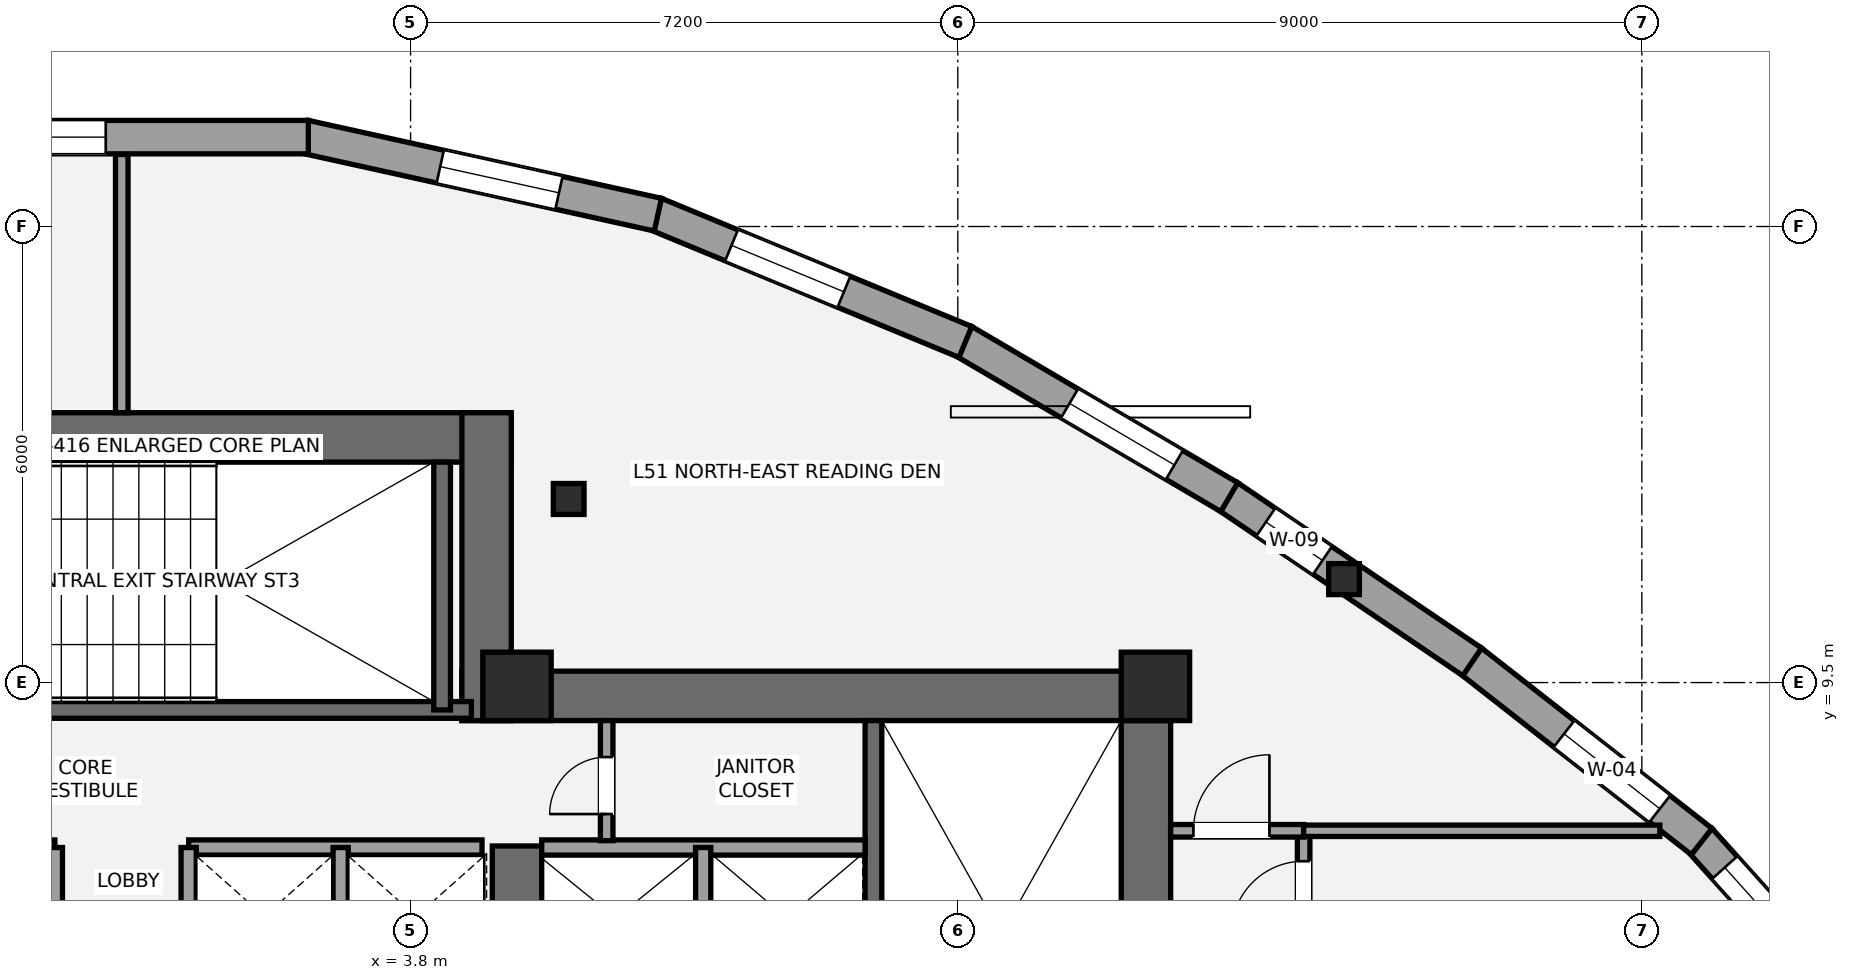
"""IFC4 building model, lengths in metres.
Left out: names, types, materials, properties, quantities, classifications, styles, units other than length and angle.
Written with IfcOpenShell. Run it as: python <this file> out.ifc"""

import sys

from ifc_helpers import new_model, si_unit, direction, frame, frame_2d, origin, origin_2d, place, context, subcontext, project, spatial, rectangle, i_section, extrude, element, fill, save


model = new_model("IFC4")
c1 = context("Model", 3, precision=1e-05, world=origin(), true_north=direction((0.0, 1.0)))
c2 = subcontext(c1, "Body", "Model", "MODEL_VIEW")
j1 = project(units=[si_unit("LENGTHUNIT", "METRE"), si_unit("PLANEANGLEUNIT", "RADIAN")], contexts=[c1])
p1 = place(None, origin())
s1 = spatial("IfcSite", under=j1, at=p1, CompositionType="ELEMENT")
p2 = place(p1, origin())
s2 = spatial("IfcBuilding", under=s1, at=p2, CompositionType="ELEMENT")
p3 = place(p2, frame((0.0, 0.0, 185.4)))
s3 = spatial("IfcBuildingStorey", under=s2, at=p3, CompositionType="ELEMENT", Elevation=185.4)
p4 = place(p3, frame((13.475, 1.2, 0.0), z_axis=(0.0, 0.0, 1.0), x_axis=(0.0, 1.0, 0.0)))
e1 = element("IfcWall", 1, at=p4, inside=s3, PredefinedType="SHEAR", context=c2, shape_type="SweptSolid", body=[
    extrude(rectangle(XDim=8.45, YDim=0.65, at=frame_2d((4.225, 0.0))), origin(), (0.0, 0.0, 1.0), 3.2),
])
p5 = place(p3, frame((4.475, 9.325, 0.0), z_axis=(0.0, 0.0, 1.0), x_axis=(1.0, 0.0, 0.0)))
e2 = element("IfcWall", 2, at=p5, inside=s3, PredefinedType="SHEAR", context=c2, shape_type="SweptSolid", body=[
    extrude(rectangle(XDim=9.325, YDim=0.65, at=frame_2d((4.663, 0.0))), origin(), (0.0, 0.0, 1.0), 3.2),
])
p6 = place(p3, frame((5.2, 5.35, 0.0), z_axis=(0.0, 0.0, 1.0), x_axis=(0.0, 1.0, 0.0)))
e3 = element("IfcWall", 3, at=p6, inside=s3, PredefinedType="SHEAR", context=c2, shape_type="SweptSolid", body=[
    extrude(rectangle(XDim=2.0, YDim=0.65, at=frame_2d((1.0, 0.0))), origin(), (0.0, 0.0, 1.0), 3.2),
])
p7 = place(p3, frame((9.89, 1.85, 0.0), z_axis=(0.0, 0.0, 1.0), x_axis=(0.0, 1.0, 0.0)))
e4 = element("IfcWall", 4, at=p7, inside=s3, PredefinedType="SHEAR", context=c2, shape_type="SweptSolid", body=[
    extrude(rectangle(XDim=7.15, YDim=0.22, at=frame_2d((3.575, 0.0))), origin(), (0.0, 0.0, 1.0), 3.2),
])
p8 = place(p3, frame((-5.125, 12.725, 0.0), z_axis=(0.0, 0.0, 1.0), x_axis=(1.0, 0.0, 0.0)))
e5 = element("IfcWall", 5, at=p8, inside=s3, PredefinedType="SHEAR", context=c2, shape_type="SweptSolid", body=[
    extrude(rectangle(XDim=10.25, YDim=0.65, at=frame_2d((5.125, 0.0))), origin(), (0.0, 0.0, 1.0), 3.2),
])
p9 = place(p3, frame((4.8, 9.0, 0.0), z_axis=(0.0, 0.0, 1.0), x_axis=(0.0, 1.0, 0.0)))
e6 = element("IfcWall", 6, at=p9, inside=s3, PredefinedType="SHEAR", context=c2, shape_type="SweptSolid", body=[
    extrude(rectangle(XDim=4.05, YDim=0.65, at=frame_2d((2.025, 0.0))), origin(), (0.0, 0.0, 1.0), 3.2),
])
p10 = place(p3, frame((-4.7, 9.14, 0.0), z_axis=(0.0, 0.0, 1.0), x_axis=(1.0, 0.0, 0.0)))
e7 = element("IfcWall", 7, at=p10, inside=s3, PredefinedType="SHEAR", context=c2, shape_type="SweptSolid", body=[
    extrude(rectangle(XDim=9.3, YDim=0.22, at=frame_2d((4.65, 0.0))), origin(), (0.0, 0.0, 1.0), 3.2),
])
p11 = place(p10, frame((1.15, 0.0, 0.0)))
e8 = element("IfcOpeningElement", 8, at=p11, cuts=e7, PredefinedType="OPENING", context=c2, shape_type="SweptSolid", body=[
    extrude(rectangle(XDim=1.05, YDim=2.15, at=frame_2d((0.525, 1.075))), frame((0.0, 0.12, 0.0), z_axis=(0.0, -1.0, 0.0), x_axis=(1.0, 0.0, 0.0)), (0.0, 0.0, 1.0), 0.24),
])
p12 = place(p3, frame((4.215, 9.14, 0.0), z_axis=(0.0, 0.0, 1.0), x_axis=(0.0, 1.0, 0.0)))
e9 = element("IfcWall", 9, at=p12, inside=s3, PredefinedType="SHEAR", context=c2, shape_type="SweptSolid", body=[
    extrude(rectangle(XDim=3.26, YDim=0.22, at=frame_2d((1.63, 0.0))), origin(), (0.0, 0.0, 1.0), 3.2),
])
for number, where, z_axis, x_axis in (
    (10, (5.2, 9.45, 0.0), (0.0, 0.0, 1.0), (1.0, 0.0, 0.0)),
    (11, (13.6, 9.45, 0.0), (0.0, 0.0, 1.0), (1.0, 0.0, 0.0)),
):
    element("IfcColumn", number, at=place(p3, frame(where, z_axis=z_axis, x_axis=x_axis)), inside=s3, PredefinedType="COLUMN", context=c2, shape_type="SweptSolid", body=[
        extrude(rectangle(XDim=0.9, YDim=0.9, at=origin_2d()), origin(), (0.0, 0.0, 1.0), 3.2),
    ])
for number, where, z_axis, x_axis in (
    (12, (16.082, 10.861, 0.0), (0.0, 0.0, 1.0), (1.0, 0.0, 0.0)),
    (13, (5.88, 11.915, 0.0), (0.0, 0.0, 1.0), (1.0, 0.0, 0.0)),
):
    element("IfcColumn", number, at=place(p3, frame(where, z_axis=z_axis, x_axis=x_axis)), inside=s3, PredefinedType="COLUMN", context=c2, shape_type="SweptSolid", body=[
        extrude(i_section(OverallWidth=0.404, OverallDepth=0.407, WebThickness=0.027, FlangeThickness=0.044, at=origin_2d()), origin(), (0.0, 0.0, 1.0), 3.2),
    ])
p13 = place(p3, frame((20.759, 7.435, 0.0), z_axis=(0.0, 0.0, 1.0), x_axis=(0.668547778607, -0.743669192396, 0.0)))
e14 = element("IfcWall", 14, at=p13, inside=s3, PredefinedType="STANDARD", context=c2, shape_type="SweptSolid", body=[
    extrude(rectangle(XDim=3.721, YDim=0.44, at=frame_2d((1.861, 0.0))), origin(), (0.0, 0.0, 1.0), 2.315),
])
p14 = place(p13, frame((0.495, 0.0, 0.58)))
e15 = element("IfcOpeningElement", 15, at=p14, cuts=e14, PredefinedType="OPENING", context=c2, shape_type="SweptSolid", body=[
    extrude(rectangle(XDim=1.6, YDim=1.55, at=frame_2d((0.8, 0.775))), frame((0.0, 0.23, 0.0), z_axis=(0.0, -1.0, 0.0), x_axis=(1.0, 0.0, 0.0)), (0.0, 0.0, 1.0), 0.46),
])
p15 = place(p3, frame((17.756, 9.781, 0.0), z_axis=(0.0, 0.0, 1.0), x_axis=(0.787518383176, -0.616291161838, 0.0)))
e16 = element("IfcWall", 16, at=p15, inside=s3, PredefinedType="STANDARD", context=c2, shape_type="SweptSolid", body=[
    extrude(rectangle(XDim=3.85, YDim=0.44, at=frame_2d((1.925, 0.0))), origin(), (0.0, 0.0, 1.0), 2.315),
])
p16 = place(p15, frame((1.55, 0.0, 0.58)))
e17 = element("IfcOpeningElement", 17, at=p16, cuts=e16, PredefinedType="OPENING", context=c2, shape_type="SweptSolid", body=[
    extrude(rectangle(XDim=1.6, YDim=1.55, at=frame_2d((0.8, 0.775))), frame((0.0, 0.23, 0.0), z_axis=(0.0, -1.0, 0.0), x_axis=(1.0, 0.0, 0.0)), (0.0, 0.0, 1.0), 0.46),
])
p17 = place(p3, frame((14.56, 11.947, 0.0), z_axis=(0.0, 0.0, 1.0), x_axis=(0.82774221662, -0.561108565988, 0.0)))
e18 = element("IfcWall", 18, at=p17, inside=s3, PredefinedType="STANDARD", context=c2, shape_type="SweptSolid", body=[
    extrude(rectangle(XDim=3.876, YDim=0.44, at=frame_2d((1.938, 0.0))), origin(), (0.0, 0.0, 1.0), 2.315),
])
p18 = place(p17, frame((0.596, 0.0, 0.58)))
e19 = element("IfcOpeningElement", 19, at=p18, cuts=e18, PredefinedType="OPENING", context=c2, shape_type="SweptSolid", body=[
    extrude(rectangle(XDim=0.9, YDim=1.35, at=frame_2d((0.45, 0.675))), frame((0.0, 0.23, 0.0), z_axis=(0.0, -1.0, 0.0), x_axis=(1.0, 0.0, 0.0)), (0.0, 0.0, 1.0), 0.46),
])
p19 = place(p3, frame((11.072, 13.995, 0.0), z_axis=(0.0, 0.0, 1.0), x_axis=(0.862269598443, -0.506449542995, 0.0)))
e20 = element("IfcWall", 20, at=p19, inside=s3, PredefinedType="STANDARD", context=c2, shape_type="SweptSolid", body=[
    extrude(rectangle(XDim=4.059, YDim=0.44, at=frame_2d((2.029, 0.0))), origin(), (0.0, 0.0, 1.0), 2.315),
])
p20 = place(p19, frame((1.621, 0.0, 0.58)))
e21 = element("IfcOpeningElement", 21, at=p20, cuts=e20, PredefinedType="OPENING", context=c2, shape_type="SweptSolid", body=[
    extrude(rectangle(XDim=1.6, YDim=1.55, at=frame_2d((0.8, 0.775))), frame((0.0, 0.23, 0.0), z_axis=(0.0, -1.0, 0.0), x_axis=(1.0, 0.0, 0.0)), (0.0, 0.0, 1.0), 0.46),
])
p21 = place(p3, frame((7.018, 15.667, 0.0), z_axis=(0.0, 0.0, 1.0), x_axis=(0.924224109839, -0.381850487486, 0.0)))
e22 = element("IfcWall", 22, at=p21, inside=s3, PredefinedType="STANDARD", context=c2, shape_type="SweptSolid", body=[
    extrude(rectangle(XDim=4.417, YDim=0.44, at=frame_2d((2.208, 0.0))), origin(), (0.0, 0.0, 1.0), 2.315),
])
p22 = place(p21, frame((1.088, 0.0, 0.58)))
e23 = element("IfcOpeningElement", 23, at=p22, cuts=e22, PredefinedType="OPENING", context=c2, shape_type="SweptSolid", body=[
    extrude(rectangle(XDim=1.6, YDim=1.55, at=frame_2d((0.8, 0.775))), frame((0.0, 0.23, 0.0), z_axis=(0.0, -1.0, 0.0), x_axis=(1.0, 0.0, 0.0)), (0.0, 0.0, 1.0), 0.46),
])
p23 = place(p3, frame((2.407, 16.681, 0.0), z_axis=(0.0, 0.0, 1.0), x_axis=(0.976520281828, -0.215425484049, 0.0)))
e24 = element("IfcWall", 24, at=p23, inside=s3, PredefinedType="STANDARD", context=c2, shape_type="SweptSolid", body=[
    extrude(rectangle(XDim=4.759, YDim=0.44, at=frame_2d((2.379, 0.0))), origin(), (0.0, 0.0, 1.0), 2.315),
])
p24 = place(p23, frame((1.826, 0.0, 0.58)))
e25 = element("IfcOpeningElement", 25, at=p24, cuts=e24, PredefinedType="OPENING", context=c2, shape_type="SweptSolid", body=[
    extrude(rectangle(XDim=1.6, YDim=1.55, at=frame_2d((0.8, 0.775))), frame((0.0, 0.23, 0.0), z_axis=(0.0, -1.0, 0.0), x_axis=(1.0, 0.0, 0.0)), (0.0, 0.0, 1.0), 0.46),
])
p25 = place(p3, frame((-2.455, 16.676, 0.0), z_axis=(0.0, 0.0, 1.0), x_axis=(1.0, 0.0, 0.0)))
e26 = element("IfcWall", 26, at=p25, inside=s3, PredefinedType="STANDARD", context=c2, shape_type="SweptSolid", body=[
    extrude(rectangle(XDim=4.909, YDim=0.44, at=frame_2d((2.455, 0.0))), origin(), (0.0, 0.0, 1.0), 2.315),
])
p26 = place(p25, frame((0.644, 0.0, 0.58)))
e27 = element("IfcOpeningElement", 27, at=p26, cuts=e26, PredefinedType="OPENING", context=c2, shape_type="SweptSolid", body=[
    extrude(rectangle(XDim=1.6, YDim=1.55, at=frame_2d((0.8, 0.775))), frame((0.0, 0.23, 0.0), z_axis=(0.0, -1.0, 0.0), x_axis=(1.0, 0.0, 0.0)), (0.0, 0.0, 1.0), 0.46),
])
p27 = place(p3, frame((5.525, 7.33, 0.0), z_axis=(0.0, 0.0, 1.0), x_axis=(1.0, 0.0, 0.0)))
e28 = element("IfcWall", 28, at=p27, inside=s3, PredefinedType="SOLIDWALL", context=c2, shape_type="SweptSolid", body=[
    extrude(rectangle(XDim=4.255, YDim=0.2, at=frame_2d((2.127, 0.0))), origin(), (0.0, 0.0, 1.0), 3.02),
])
p28 = place(p3, frame((7.65, 5.47, 0.0), z_axis=(0.0, 0.0, 1.0), x_axis=(0.0, 1.0, 0.0)))
e29 = element("IfcWall", 29, at=p28, inside=s3, PredefinedType="SOLIDWALL", context=c2, shape_type="SweptSolid", body=[
    extrude(rectangle(XDim=1.86, YDim=0.2, at=frame_2d((0.93, 0.0))), origin(), (0.0, 0.0, 1.0), 3.02),
])
for number, where, z_axis, x_axis in (
    (30, (-4.74, 7.33, 0.0), (0.0, 0.0, 1.0), (1.0, 0.0, 0.0)),
    (31, (0.88, 7.33, 0.0), (0.0, 0.0, 1.0), (1.0, 0.0, 0.0)),
):
    element("IfcWall", number, at=place(p3, frame(where, z_axis=z_axis, x_axis=x_axis)), inside=s3, PredefinedType="SOLIDWALL", context=c2, shape_type="SweptSolid", body=[
        extrude(rectangle(XDim=3.86, YDim=0.2, at=frame_2d((1.93, 0.0))), origin(), (0.0, 0.0, 1.0), 3.02),
    ])
for number, where, z_axis, x_axis in (
    (32, (2.88, 5.52, 0.0), (0.0, 0.0, 1.0), (0.0, 1.0, 0.0)),
    (33, (-0.88, 5.52, 0.0), (0.0, 0.0, 1.0), (0.0, 1.0, 0.0)),
    (34, (0.88, 5.52, 0.0), (0.0, 0.0, 1.0), (0.0, 1.0, 0.0)),
):
    element("IfcWall", number, at=place(p3, frame(where, z_axis=z_axis, x_axis=x_axis)), inside=s3, PredefinedType="SOLIDWALL", context=c2, shape_type="SweptSolid", body=[
        extrude(rectangle(XDim=1.81, YDim=0.2, at=frame_2d((0.905, 0.0))), origin(), (0.0, 0.0, 1.0), 3.02),
    ])
p29 = place(p3, frame((6.38, 7.42, 0.0), z_axis=(0.0, 0.0, 1.0), x_axis=(0.0, 1.0, 0.0)))
e35 = element("IfcWall", 35, at=p29, inside=s3, PredefinedType="PARTITIONING", context=c2, shape_type="SweptSolid", body=[
    extrude(rectangle(XDim=1.58, YDim=0.165, at=frame_2d((0.79, 0.0))), origin(), (0.0, 0.0, 1.0), 3.02),
])
p30 = place(p29, frame((0.35, 0.0, 0.0)))
e36 = element("IfcOpeningElement", 36, at=p30, cuts=e35, PredefinedType="OPENING", context=c2, shape_type="SweptSolid", body=[
    extrude(rectangle(XDim=0.75, YDim=2.1, at=frame_2d((0.375, 1.05))), frame((0.0, 0.093, 0.0), z_axis=(0.0, -1.0, 0.0), x_axis=(1.0, 0.0, 0.0)), (0.0, 0.0, 1.0), 0.185),
])
p31 = place(p3, frame((15.55, -11.0, 0.0), z_axis=(0.0, 0.0, 1.0), x_axis=(0.0, 1.0, 0.0)))
e37 = element("IfcWall", 37, at=p31, inside=s3, PredefinedType="PARTITIONING", context=c2, shape_type="SweptSolid", body=[
    extrude(rectangle(XDim=18.55, YDim=0.165, at=frame_2d((9.275, 0.0))), origin(), (0.0, 0.0, 1.0), 2.473),
])
p32 = place(p31, frame((4.0, 0.0, 0.0)))
e38 = element("IfcOpeningElement", 38, at=p32, cuts=e37, PredefinedType="OPENING", context=c2, shape_type="SweptSolid", body=[
    extrude(rectangle(XDim=0.85, YDim=2.1, at=frame_2d((0.425, 1.05))), frame((0.0, 0.093, 0.0), z_axis=(0.0, -1.0, 0.0), x_axis=(1.0, 0.0, 0.0)), (0.0, 0.0, 1.0), 0.185),
])
p33 = place(p31, frame((8.05, 0.0, 0.0)))
e39 = element("IfcOpeningElement", 39, at=p33, cuts=e37, PredefinedType="OPENING", context=c2, shape_type="SweptSolid", body=[
    extrude(rectangle(XDim=0.95, YDim=2.15, at=frame_2d((0.475, 1.075))), frame((0.0, 0.093, 0.0), z_axis=(0.0, -1.0, 0.0), x_axis=(1.0, 0.0, 0.0)), (0.0, 0.0, 1.0), 0.185),
])
p34 = place(p31, frame((12.45, 0.0, 0.0)))
e40 = element("IfcOpeningElement", 40, at=p34, cuts=e37, PredefinedType="OPENING", context=c2, shape_type="SweptSolid", body=[
    extrude(rectangle(XDim=0.95, YDim=2.15, at=frame_2d((0.475, 1.075))), frame((0.0, 0.093, 0.0), z_axis=(0.0, -1.0, 0.0), x_axis=(1.0, 0.0, 0.0)), (0.0, 0.0, 1.0), 0.185),
])
p35 = place(p31, frame((17.2, 0.0, 0.0)))
e41 = element("IfcOpeningElement", 41, at=p35, cuts=e37, PredefinedType="OPENING", context=c2, shape_type="SweptSolid", body=[
    extrude(rectangle(XDim=0.95, YDim=2.15, at=frame_2d((0.475, 1.075))), frame((0.0, 0.093, 0.0), z_axis=(0.0, -1.0, 0.0), x_axis=(1.0, 0.0, 0.0)), (0.0, 0.0, 1.0), 0.185),
])
p36 = place(p3, frame((13.8, 7.55, 0.0), z_axis=(0.0, 0.0, 1.0), x_axis=(1.0, 0.0, 0.0)))
e42 = element("IfcWall", 42, at=p36, inside=s3, PredefinedType="PARTITIONING", context=c2, shape_type="SweptSolid", body=[
    extrude(rectangle(XDim=1.75, YDim=0.165, at=frame_2d((0.875, 0.0))), origin(), (0.0, 0.0, 1.0), 3.02),
])
p37 = place(p36, frame((0.3, 0.0, 0.0)))
e43 = element("IfcOpeningElement", 43, at=p37, cuts=e42, PredefinedType="OPENING", context=c2, shape_type="SweptSolid", body=[
    extrude(rectangle(XDim=1.0, YDim=2.15, at=frame_2d((0.5, 1.075))), frame((0.0, 0.093, 0.0), z_axis=(0.0, -1.0, 0.0), x_axis=(1.0, 0.0, 0.0)), (0.0, 0.0, 1.0), 0.185),
])
p38 = place(p3, frame((15.55, 7.55, 0.0), z_axis=(0.0, 0.0, 1.0), x_axis=(1.0, 0.0, 0.0)))
e44 = element("IfcWall", 44, at=p38, inside=s3, PredefinedType="PLUMBINGWALL", context=c2, shape_type="SweptSolid", body=[
    extrude(rectangle(XDim=4.686, YDim=0.15, at=frame_2d((2.343, 0.0))), origin(), (0.0, 0.0, 1.0), 2.473),
])
p39 = place(p3, frame((0.0, 13.05, 0.0), z_axis=(0.0, 0.0, 1.0), x_axis=(0.0, 1.0, 0.0)))
e45 = element("IfcWall", 45, at=p39, inside=s3, PredefinedType="PARTITIONING", context=c2, shape_type="SweptSolid", body=[
    extrude(rectangle(XDim=3.398, YDim=0.165, at=frame_2d((1.699, 0.0))), origin(), (0.0, 0.0, 1.0), 3.02),
])
p40 = place(p14, origin())
e46 = element("IfcWindow", 46, at=p40, inside=s3, PartitioningType="SINGLE_PANEL", PredefinedType="WINDOW", context=c2, shape_type="SweptSolid", body=[
    extrude(rectangle(XDim=1.6, YDim=1.55, at=frame_2d((0.8, 0.775))), frame((0.0, -0.01, 0.0), z_axis=(0.0, -1.0, 0.0), x_axis=(1.0, 0.0, 0.0)), (0.0, 0.0, 1.0), 0.06),
])
fill(e15, e46)
p41 = place(p16, origin())
e47 = element("IfcWindow", 47, at=p41, inside=s3, PartitioningType="SINGLE_PANEL", PredefinedType="WINDOW", context=c2, shape_type="SweptSolid", body=[
    extrude(rectangle(XDim=1.6, YDim=1.55, at=frame_2d((0.8, 0.775))), frame((0.0, -0.01, 0.0), z_axis=(0.0, -1.0, 0.0), x_axis=(1.0, 0.0, 0.0)), (0.0, 0.0, 1.0), 0.06),
])
fill(e17, e47)
p42 = place(p18, origin())
e48 = element("IfcWindow", 48, at=p42, inside=s3, PartitioningType="SINGLE_PANEL", PredefinedType="WINDOW", context=c2, shape_type="SweptSolid", body=[
    extrude(rectangle(XDim=0.9, YDim=1.35, at=frame_2d((0.45, 0.675))), frame((0.0, -0.01, 0.0), z_axis=(0.0, -1.0, 0.0), x_axis=(1.0, 0.0, 0.0)), (0.0, 0.0, 1.0), 0.06),
])
fill(e19, e48)
p43 = place(p20, origin())
e49 = element("IfcWindow", 49, at=p43, inside=s3, PartitioningType="SINGLE_PANEL", PredefinedType="WINDOW", context=c2, shape_type="SweptSolid", body=[
    extrude(rectangle(XDim=1.6, YDim=1.55, at=frame_2d((0.8, 0.775))), frame((0.0, -0.01, 0.0), z_axis=(0.0, -1.0, 0.0), x_axis=(1.0, 0.0, 0.0)), (0.0, 0.0, 1.0), 0.06),
])
fill(e21, e49)
p44 = place(p22, origin())
e50 = element("IfcWindow", 50, at=p44, inside=s3, PartitioningType="SINGLE_PANEL", PredefinedType="WINDOW", context=c2, shape_type="SweptSolid", body=[
    extrude(rectangle(XDim=1.6, YDim=1.55, at=frame_2d((0.8, 0.775))), frame((0.0, -0.01, 0.0), z_axis=(0.0, -1.0, 0.0), x_axis=(1.0, 0.0, 0.0)), (0.0, 0.0, 1.0), 0.06),
])
fill(e23, e50)
p45 = place(p24, origin())
e51 = element("IfcWindow", 51, at=p45, inside=s3, PartitioningType="SINGLE_PANEL", PredefinedType="WINDOW", context=c2, shape_type="SweptSolid", body=[
    extrude(rectangle(XDim=1.6, YDim=1.55, at=frame_2d((0.8, 0.775))), frame((0.0, -0.01, 0.0), z_axis=(0.0, -1.0, 0.0), x_axis=(1.0, 0.0, 0.0)), (0.0, 0.0, 1.0), 0.06),
])
fill(e25, e51)
p46 = place(p26, origin())
e52 = element("IfcWindow", 52, at=p46, inside=s3, PartitioningType="SINGLE_PANEL", PredefinedType="WINDOW", context=c2, shape_type="SweptSolid", body=[
    extrude(rectangle(XDim=1.6, YDim=1.55, at=frame_2d((0.8, 0.775))), frame((0.0, -0.01, 0.0), z_axis=(0.0, -1.0, 0.0), x_axis=(1.0, 0.0, 0.0)), (0.0, 0.0, 1.0), 0.06),
])
fill(e27, e52)
p47 = place(p30, origin())
e53 = element("IfcDoor", 53, at=p47, inside=s3, OperationType="SINGLE_SWING_LEFT", PredefinedType="DOOR", context=c2, shape_type="SweptSolid", body=[
    extrude(rectangle(XDim=0.75, YDim=2.1, at=frame_2d((0.375, 1.05))), frame((0.0, 0.025, 0.0), z_axis=(0.0, -1.0, 0.0), x_axis=(1.0, 0.0, 0.0)), (0.0, 0.0, 1.0), 0.05),
])
fill(e36, e53)
p48 = place(p37, origin())
e54 = element("IfcDoor", 54, at=p48, inside=s3, OperationType="SINGLE_SWING_RIGHT", PredefinedType="DOOR", context=c2, shape_type="SweptSolid", body=[
    extrude(rectangle(XDim=1.0, YDim=2.15, at=frame_2d((0.5, 1.075))), frame((0.0, 0.025, 0.0), z_axis=(0.0, -1.0, 0.0), x_axis=(1.0, 0.0, 0.0)), (0.0, 0.0, 1.0), 0.05),
])
fill(e43, e54)
p49 = place(p35, origin())
e55 = element("IfcDoor", 55, at=p49, inside=s3, OperationType="SINGLE_SWING_LEFT", PredefinedType="DOOR", context=c2, shape_type="SweptSolid", body=[
    extrude(rectangle(XDim=0.95, YDim=2.15, at=frame_2d((0.475, 1.075))), frame((0.0, 0.025, 0.0), z_axis=(0.0, -1.0, 0.0), x_axis=(1.0, 0.0, 0.0)), (0.0, 0.0, 1.0), 0.05),
])
fill(e41, e55)
save(model, sys.argv[1])
